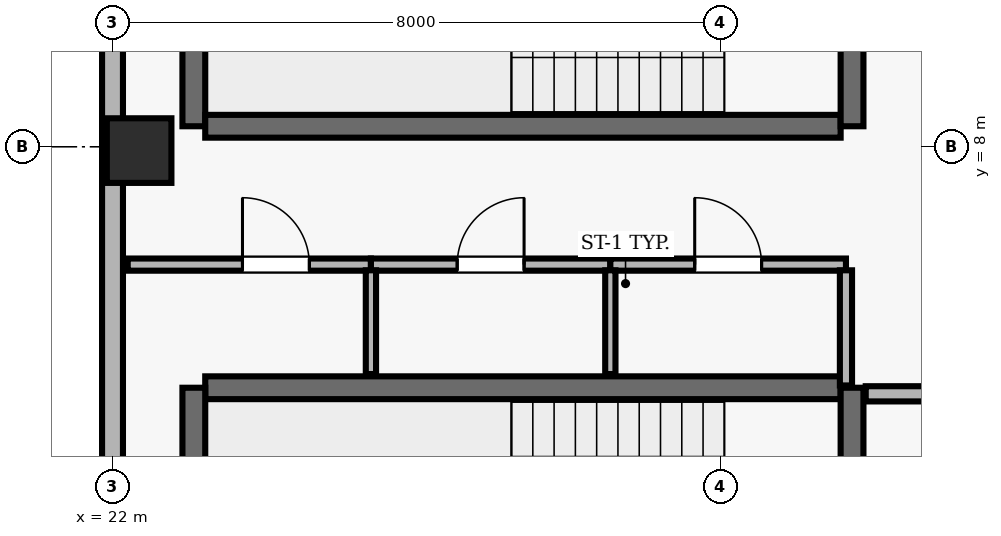
"""IFC4 building model, lengths in metres.
Left out: names, types, materials, properties, quantities, classifications, styles, units other than length and angle.
Written with IfcOpenShell. Run it as: python <this file> out.ifc"""

import sys

from ifc_helpers import new_model, si_unit, direction, frame, frame_2d, origin, origin_2d, place, context, subcontext, project, spatial, rectangle, extrude, element, fill, save


model = new_model("IFC4")
c1 = context("Model", 3, precision=1e-05, world=origin(), true_north=direction((0.0, 1.0)))
c2 = subcontext(c1, "Body", "Model", "MODEL_VIEW")
j1 = project(units=[si_unit("LENGTHUNIT", "METRE"), si_unit("PLANEANGLEUNIT", "RADIAN")], contexts=[c1])
p1 = place(None, origin())
s1 = spatial("IfcSite", under=j1, at=p1, CompositionType="ELEMENT")
p2 = place(p1, origin())
s2 = spatial("IfcBuilding", under=s1, at=p2, CompositionType="ELEMENT")
p3 = place(p2, frame((0.0, 0.0, 252.1)))
s3 = spatial("IfcBuildingStorey", under=s2, at=p3, CompositionType="ELEMENT", Elevation=252.1)
p4 = place(p3, frame((22.35, 7.95, 0.0), z_axis=(0.0, 0.0, 1.0), x_axis=(1.0, 0.0, 0.0)))
e1 = element("IfcColumn", 1, at=p4, inside=s3, PredefinedType="COLUMN", context=c2, shape_type="SweptSolid", body=[
    extrude(rectangle(XDim=0.85, YDim=0.85, at=origin_2d()), origin(), (0.0, 0.0, 1.0), 3.9),
])
p5 = place(p3, frame((22.0, 35.3, 0.0), z_axis=(0.0, 0.0, 1.0), x_axis=(0.0, -1.0, 0.0)))
e2 = element("IfcWall", 2, at=p5, inside=s3, PredefinedType="SOLIDWALL", context=c2, shape_type="SweptSolid", body=[
    extrude(rectangle(XDim=32.8, YDim=0.275, at=frame_2d((16.4, 0.0))), origin(), (0.0, 0.0, 1.0), 3.69),
])
p6 = place(p5, frame((7.3, 0.0, 0.0)))
e3 = element("IfcOpeningElement", 3, at=p6, cuts=e2, PredefinedType="OPENING", context=c2, shape_type="SweptSolid", body=[
    extrude(rectangle(XDim=1.0, YDim=2.2, at=frame_2d((0.5, 1.1))), frame((0.0, 0.147, 0.0), z_axis=(0.0, -1.0, 0.0), x_axis=(1.0, 0.0, 0.0)), (0.0, 0.0, 1.0), 0.295),
])
p7 = place(p5, frame((1.983, 0.0, 0.9)))
e4 = element("IfcOpeningElement", 4, at=p7, cuts=e2, PredefinedType="OPENING", context=c2, shape_type="SweptSolid", body=[
    extrude(rectangle(XDim=1.5, YDim=1.6, at=frame_2d((0.75, 0.8))), frame((0.0, 0.147, 0.0), z_axis=(0.0, -1.0, 0.0), x_axis=(1.0, 0.0, 0.0)), (0.0, 0.0, 1.0), 0.295),
])
p8 = place(p5, frame((12.917, 0.0, 0.9)))
e5 = element("IfcOpeningElement", 5, at=p8, cuts=e2, PredefinedType="OPENING", context=c2, shape_type="SweptSolid", body=[
    extrude(rectangle(XDim=1.5, YDim=1.6, at=frame_2d((0.75, 0.8))), frame((0.0, 0.147, 0.0), z_axis=(0.0, -1.0, 0.0), x_axis=(1.0, 0.0, 0.0)), (0.0, 0.0, 1.0), 0.295),
])
p9 = place(p5, frame((18.383, 0.0, 0.9)))
e6 = element("IfcOpeningElement", 6, at=p9, cuts=e2, PredefinedType="OPENING", context=c2, shape_type="SweptSolid", body=[
    extrude(rectangle(XDim=1.5, YDim=1.6, at=frame_2d((0.75, 0.8))), frame((0.0, 0.147, 0.0), z_axis=(0.0, -1.0, 0.0), x_axis=(1.0, 0.0, 0.0)), (0.0, 0.0, 1.0), 0.295),
])
p10 = place(p5, frame((23.85, 0.0, 0.9)))
e7 = element("IfcOpeningElement", 7, at=p10, cuts=e2, PredefinedType="OPENING", context=c2, shape_type="SweptSolid", body=[
    extrude(rectangle(XDim=1.5, YDim=1.6, at=frame_2d((0.75, 0.8))), frame((0.0, 0.147, 0.0), z_axis=(0.0, -1.0, 0.0), x_axis=(1.0, 0.0, 0.0)), (0.0, 0.0, 1.0), 0.295),
])
p11 = place(p3, frame((31.58, 4.83, 0.0), z_axis=(0.0, 0.0, 1.0), x_axis=(-1.0, 0.0, 0.0)))
e8 = element("IfcWall", 8, at=p11, inside=s3, PredefinedType="SHEAR", context=c2, shape_type="SweptSolid", body=[
    extrude(rectangle(XDim=8.36, YDim=0.3, at=frame_2d((4.18, 0.0))), origin(), (0.0, 0.0, 1.0), 3.69),
])
p12 = place(p3, frame((23.07, 4.83, 0.0), z_axis=(0.0, 0.0, 1.0), x_axis=(0.0, -1.0, 0.0)))
e9 = element("IfcWall", 9, at=p12, inside=s3, PredefinedType="SHEAR", context=c2, shape_type="SweptSolid", body=[
    extrude(rectangle(XDim=3.51, YDim=0.3, at=frame_2d((1.755, 0.0))), origin(), (0.0, 0.0, 1.0), 3.69),
])
p13 = place(p3, frame((31.73, 0.96, 0.0), z_axis=(0.0, 0.0, 1.0), x_axis=(0.0, 1.0, 0.0)))
e10 = element("IfcWall", 10, at=p13, inside=s3, PredefinedType="SHEAR", context=c2, shape_type="SweptSolid", body=[
    extrude(rectangle(XDim=3.87, YDim=0.3, at=frame_2d((1.935, 0.0))), origin(), (0.0, 0.0, 1.0), 3.69),
])
p14 = place(p13, frame((1.54, 0.0, 0.0)))
e11 = element("IfcOpeningElement", 11, at=p14, cuts=e10, PredefinedType="OPENING", context=c2, shape_type="SweptSolid", body=[
    extrude(rectangle(XDim=1.15, YDim=2.15, at=frame_2d((0.575, 1.075))), frame((0.0, 0.16, 0.0), z_axis=(0.0, -1.0, 0.0), x_axis=(1.0, 0.0, 0.0)), (0.0, 0.0, 1.0), 0.32),
])
p15 = place(p3, frame((23.07, 11.78, 0.0), z_axis=(0.0, 0.0, 1.0), x_axis=(0.0, -1.0, 0.0)))
e12 = element("IfcWall", 12, at=p15, inside=s3, PredefinedType="SHEAR", context=c2, shape_type="SweptSolid", body=[
    extrude(rectangle(XDim=3.51, YDim=0.3, at=frame_2d((1.755, 0.0))), origin(), (0.0, 0.0, 1.0), 3.69),
])
p16 = place(p3, frame((23.22, 8.27, 0.0), z_axis=(0.0, 0.0, 1.0), x_axis=(1.0, 0.0, 0.0)))
e13 = element("IfcWall", 13, at=p16, inside=s3, PredefinedType="SHEAR", context=c2, shape_type="SweptSolid", body=[
    extrude(rectangle(XDim=8.36, YDim=0.3, at=frame_2d((4.18, 0.0))), origin(), (0.0, 0.0, 1.0), 3.69),
])
p17 = place(p3, frame((31.73, 8.27, 0.0), z_axis=(0.0, 0.0, 1.0), x_axis=(0.0, 1.0, 0.0)))
e14 = element("IfcWall", 14, at=p17, inside=s3, PredefinedType="SHEAR", context=c2, shape_type="SweptSolid", body=[
    extrude(rectangle(XDim=3.51, YDim=0.3, at=frame_2d((1.755, 0.0))), origin(), (0.0, 0.0, 1.0), 3.69),
])
p18 = place(p17, frame((1.18, 0.0, 0.0)))
e15 = element("IfcOpeningElement", 15, at=p18, cuts=e14, PredefinedType="OPENING", context=c2, shape_type="SweptSolid", body=[
    extrude(rectangle(XDim=1.15, YDim=2.15, at=frame_2d((0.575, 1.075))), frame((0.0, 0.16, 0.0), z_axis=(0.0, -1.0, 0.0), x_axis=(1.0, 0.0, 0.0)), (0.0, 0.0, 1.0), 0.32),
])
p19 = place(p3, frame((22.2, 6.45, 0.0), z_axis=(0.0, 0.0, 1.0), x_axis=(1.0, 0.0, 0.0)))
e16 = element("IfcWall", 16, at=p19, inside=s3, PredefinedType="PARTITIONING", context=c2, shape_type="SweptSolid", body=[
    extrude(rectangle(XDim=3.2, YDim=0.16, at=frame_2d((1.6, 0.0))), origin(), (0.0, 0.0, 1.0), 3.69),
])
p20 = place(p19, frame((1.51, 0.0, 0.0)))
e17 = element("IfcOpeningElement", 17, at=p20, cuts=e16, PredefinedType="OPENING", context=c2, shape_type="SweptSolid", body=[
    extrude(rectangle(XDim=0.88, YDim=2.1, at=frame_2d((0.44, 1.05))), frame((0.0, 0.09, 0.0), z_axis=(0.0, -1.0, 0.0), x_axis=(1.0, 0.0, 0.0)), (0.0, 0.0, 1.0), 0.18),
])
p21 = place(p3, frame((25.4, 6.45, 0.0), z_axis=(0.0, 0.0, 1.0), x_axis=(1.0, 0.0, 0.0)))
e18 = element("IfcWall", 18, at=p21, inside=s3, PredefinedType="PARTITIONING", context=c2, shape_type="SweptSolid", body=[
    extrude(rectangle(XDim=3.15, YDim=0.16, at=frame_2d((1.575, 0.0))), origin(), (0.0, 0.0, 1.0), 3.69),
])
p22 = place(p21, frame((1.135, 0.0, 0.0)))
e19 = element("IfcOpeningElement", 19, at=p22, cuts=e18, PredefinedType="OPENING", context=c2, shape_type="SweptSolid", body=[
    extrude(rectangle(XDim=0.88, YDim=2.1, at=frame_2d((0.44, 1.05))), frame((0.0, 0.09, 0.0), z_axis=(0.0, -1.0, 0.0), x_axis=(1.0, 0.0, 0.0)), (0.0, 0.0, 1.0), 0.18),
])
p23 = place(p3, frame((28.55, 6.45, 0.0), z_axis=(0.0, 0.0, 1.0), x_axis=(1.0, 0.0, 0.0)))
e20 = element("IfcWall", 20, at=p23, inside=s3, PredefinedType="PARTITIONING", context=c2, shape_type="SweptSolid", body=[
    extrude(rectangle(XDim=3.1, YDim=0.16, at=frame_2d((1.55, 0.0))), origin(), (0.0, 0.0, 1.0), 3.69),
])
p24 = place(p23, frame((1.11, 0.0, 0.0)))
e21 = element("IfcOpeningElement", 21, at=p24, cuts=e20, PredefinedType="OPENING", context=c2, shape_type="SweptSolid", body=[
    extrude(rectangle(XDim=0.88, YDim=2.1, at=frame_2d((0.44, 1.05))), frame((0.0, 0.09, 0.0), z_axis=(0.0, -1.0, 0.0), x_axis=(1.0, 0.0, 0.0)), (0.0, 0.0, 1.0), 0.18),
])
p25 = place(p3, frame((35.02, 4.75, 0.0), z_axis=(0.0, 0.0, 1.0), x_axis=(-1.0, 0.0, 0.0)))
e22 = element("IfcWall", 22, at=p25, inside=s3, PredefinedType="SOLIDWALL", context=c2, shape_type="SweptSolid", body=[
    extrude(rectangle(XDim=3.11, YDim=0.2, at=frame_2d((1.555, 0.0))), origin(), (0.0, 0.0, 1.0), 3.69),
])
p26 = place(p25, frame((1.03, 0.0, 0.0)))
e23 = element("IfcOpeningElement", 23, at=p26, cuts=e22, PredefinedType="OPENING", context=c2, shape_type="SweptSolid", body=[
    extrude(rectangle(XDim=1.05, YDim=2.15, at=frame_2d((0.525, 1.075))), frame((0.0, 0.11, 0.0), z_axis=(0.0, -1.0, 0.0), x_axis=(1.0, 0.0, 0.0)), (0.0, 0.0, 1.0), 0.22),
])
for number, where, z_axis, x_axis in (
    (24, (25.4, 5.01, 0.0), (0.0, 0.0, 1.0), (0.0, 1.0, 0.0)),
    (25, (28.55, 5.01, 0.0), (0.0, 0.0, 1.0), (0.0, 1.0, 0.0)),
):
    element("IfcWall", number, at=place(p3, frame(where, z_axis=z_axis, x_axis=x_axis)), inside=s3, PredefinedType="PARTITIONING", context=c2, shape_type="SweptSolid", body=[
        extrude(rectangle(XDim=1.365, YDim=0.135, at=frame_2d((0.683, 0.0))), origin(), (0.0, 0.0, 1.0), 3.69),
    ])
p27 = place(p3, frame((31.65, 4.86, 0.0), z_axis=(0.0, 0.0, 1.0), x_axis=(0.0, 1.0, 0.0)))
e26 = element("IfcWall", 26, at=p27, inside=s3, PredefinedType="PARTITIONING", context=c2, shape_type="SweptSolid", body=[
    extrude(rectangle(XDim=1.515, YDim=0.16, at=frame_2d((0.757, 0.0))), origin(), (0.0, 0.0, 1.0), 3.69),
])
p28 = place(p20, origin())
e27 = element("IfcDoor", 27, at=p28, inside=s3, OperationType="SINGLE_SWING_LEFT", PredefinedType="DOOR", context=c2, shape_type="SweptSolid", body=[
    extrude(rectangle(XDim=0.88, YDim=2.1, at=frame_2d((0.44, 1.05))), frame((0.0, 0.025, 0.0), z_axis=(0.0, -1.0, 0.0), x_axis=(1.0, 0.0, 0.0)), (0.0, 0.0, 1.0), 0.05),
])
fill(e17, e27)
p29 = place(p22, origin())
e28 = element("IfcDoor", 28, at=p29, inside=s3, OperationType="SINGLE_SWING_RIGHT", PredefinedType="DOOR", context=c2, shape_type="SweptSolid", body=[
    extrude(rectangle(XDim=0.88, YDim=2.1, at=frame_2d((0.44, 1.05))), frame((0.0, 0.025, 0.0), z_axis=(0.0, -1.0, 0.0), x_axis=(1.0, 0.0, 0.0)), (0.0, 0.0, 1.0), 0.05),
])
fill(e19, e28)
p30 = place(p24, origin())
e29 = element("IfcDoor", 29, at=p30, inside=s3, OperationType="SINGLE_SWING_LEFT", PredefinedType="DOOR", context=c2, shape_type="SweptSolid", body=[
    extrude(rectangle(XDim=0.88, YDim=2.1, at=frame_2d((0.44, 1.05))), frame((0.0, 0.025, 0.0), z_axis=(0.0, -1.0, 0.0), x_axis=(1.0, 0.0, 0.0)), (0.0, 0.0, 1.0), 0.05),
])
fill(e21, e29)
save(model, sys.argv[1])
